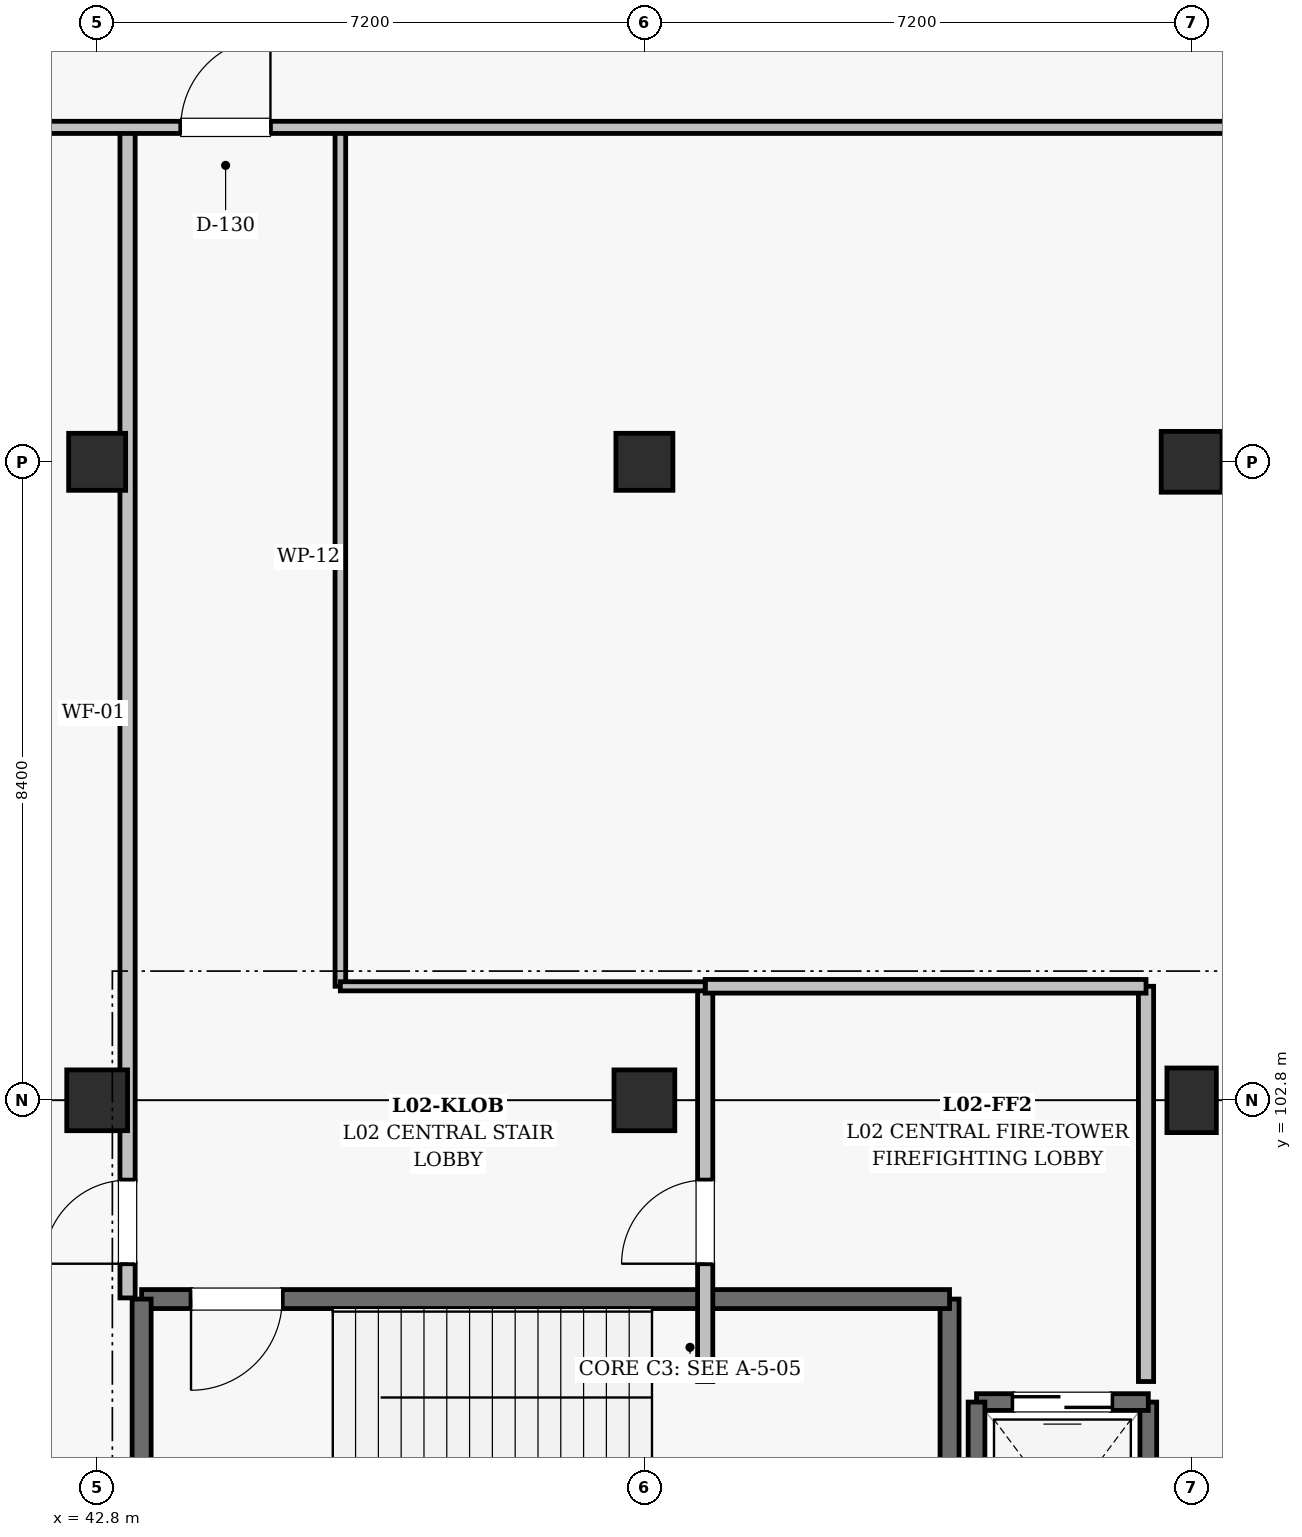
"""IFC4 building model, lengths in metres.
Left out: names, types, materials, properties, quantities, classifications, styles, units other than length and angle.
Written with IfcOpenShell. Run it as: python <this file> out.ifc"""

import sys

from ifc_helpers import new_model, si_unit, direction, frame, frame_2d, origin, origin_2d, place, context, subcontext, project, spatial, rectangle, extrude, element, fill, save


model = new_model("IFC4")
c1 = context("Model", 3, precision=1e-05, world=origin(), true_north=direction((0.0, 1.0)))
c2 = subcontext(c1, "Body", "Model", "MODEL_VIEW")
j1 = project(units=[si_unit("LENGTHUNIT", "METRE"), si_unit("PLANEANGLEUNIT", "RADIAN")], contexts=[c1])
p1 = place(None, origin())
s1 = spatial("IfcSite", under=j1, at=p1, CompositionType="ELEMENT")
p2 = place(p1, origin())
s2 = spatial("IfcBuilding", under=s1, at=p2, CompositionType="ELEMENT")
p3 = place(p2, frame((0.0, 0.0, 9.9)))
s3 = spatial("IfcBuildingStorey", under=s2, at=p3, CompositionType="ELEMENT", Elevation=9.9)
p4 = place(p3, frame((42.8, 102.8, 0.0), z_axis=(0.0, 0.0, 1.0), x_axis=(1.0, 0.0, 0.0)))
e1 = element("IfcColumn", 1, at=p4, inside=s3, PredefinedType="COLUMN", context=c2, shape_type="SweptSolid", body=[
    extrude(rectangle(XDim=0.8, YDim=0.8, at=origin_2d()), origin(), (0.0, 0.0, 1.0), 4.5),
])
p5 = place(p3, frame((42.8, 111.2, 0.0), z_axis=(0.0, 0.0, 1.0), x_axis=(1.0, 0.0, 0.0)))
e2 = element("IfcColumn", 2, at=p5, inside=s3, PredefinedType="COLUMN", context=c2, shape_type="SweptSolid", body=[
    extrude(rectangle(XDim=0.75, YDim=0.75, at=origin_2d()), origin(), (0.0, 0.0, 1.0), 4.5),
])
p6 = place(p3, frame((50.0, 102.8, 0.0), z_axis=(0.0, 0.0, 1.0), x_axis=(1.0, 0.0, 0.0)))
e3 = element("IfcColumn", 3, at=p6, inside=s3, PredefinedType="COLUMN", context=c2, shape_type="SweptSolid", body=[
    extrude(rectangle(XDim=0.8, YDim=0.8, at=origin_2d()), origin(), (0.0, 0.0, 1.0), 4.5),
])
p7 = place(p3, frame((50.0, 111.2, 0.0), z_axis=(0.0, 0.0, 1.0), x_axis=(1.0, 0.0, 0.0)))
e4 = element("IfcColumn", 4, at=p7, inside=s3, PredefinedType="COLUMN", context=c2, shape_type="SweptSolid", body=[
    extrude(rectangle(XDim=0.75, YDim=0.75, at=origin_2d()), origin(), (0.0, 0.0, 1.0), 4.5),
])
p8 = place(p3, frame((57.2, 102.8, 0.0), z_axis=(0.0, 0.0, 1.0), x_axis=(1.0, 0.0, 0.0)))
e5 = element("IfcColumn", 5, at=p8, inside=s3, PredefinedType="COLUMN", context=c2, shape_type="SweptSolid", body=[
    extrude(rectangle(XDim=0.65, YDim=0.85, at=origin_2d()), origin(), (0.0, 0.0, 1.0), 4.5),
])
p9 = place(p3, frame((57.2, 111.2, 0.0), z_axis=(0.0, 0.0, 1.0), x_axis=(1.0, 0.0, 0.0)))
e6 = element("IfcColumn", 6, at=p9, inside=s3, PredefinedType="COLUMN", context=c2, shape_type="SweptSolid", body=[
    extrude(rectangle(XDim=0.8, YDim=0.8, at=origin_2d()), origin(), (0.0, 0.0, 1.0), 4.5),
])
p10 = place(p3, frame((54.015, 95.085, 0.0), z_axis=(0.0, 0.0, 1.0), x_axis=(0.0, 1.0, 0.0)))
e7 = element("IfcWall", 7, at=p10, inside=s3, PredefinedType="SHEAR", context=c2, shape_type="SweptSolid", body=[
    extrude(rectangle(XDim=5.1, YDim=0.25, at=frame_2d((2.55, 0.0))), origin(), (0.0, 0.0, 1.0), 4.215),
])
p11 = place(p3, frame((54.015, 100.185, 0.0), z_axis=(0.0, 0.0, 1.0), x_axis=(-1.0, 0.0, 0.0)))
e8 = element("IfcWall", 8, at=p11, inside=s3, PredefinedType="SHEAR", context=c2, shape_type="SweptSolid", body=[
    extrude(rectangle(XDim=10.63, YDim=0.25, at=frame_2d((5.315, 0.0))), origin(), (0.0, 0.0, 1.0), 4.215),
])
p12 = place(p11, frame((8.78, 0.0, 0.0)))
e9 = element("IfcOpeningElement", 9, at=p12, cuts=e8, PredefinedType="OPENING", context=c2, shape_type="SweptSolid", body=[
    extrude(rectangle(XDim=1.2, YDim=2.15, at=frame_2d((0.6, 1.075))), frame((0.0, 0.135, 0.0), z_axis=(0.0, -1.0, 0.0), x_axis=(1.0, 0.0, 0.0)), (0.0, 0.0, 1.0), 0.27),
])
p13 = place(p3, frame((43.385, 100.185, 0.0), z_axis=(0.0, 0.0, 1.0), x_axis=(0.0, -1.0, 0.0)))
e10 = element("IfcWall", 10, at=p13, inside=s3, PredefinedType="SHEAR", context=c2, shape_type="SweptSolid", body=[
    extrude(rectangle(XDim=5.1, YDim=0.25, at=frame_2d((2.55, 0.0))), origin(), (0.0, 0.0, 1.0), 4.215),
])
p14 = place(p3, frame((56.63, 95.97, 0.0), z_axis=(0.0, 0.0, 1.0), x_axis=(0.0, 1.0, 0.0)))
e11 = element("IfcWall", 11, at=p14, inside=s3, PredefinedType="SHEAR", context=c2, shape_type="SweptSolid", body=[
    extrude(rectangle(XDim=2.86, YDim=0.22, at=frame_2d((1.43, 0.0))), origin(), (0.0, 0.0, 1.0), 4.215),
])
p15 = place(p3, frame((56.63, 98.83, 0.0), z_axis=(0.0, 0.0, 1.0), x_axis=(-1.0, 0.0, 0.0)))
e12 = element("IfcWall", 12, at=p15, inside=s3, PredefinedType="SHEAR", context=c2, shape_type="SweptSolid", body=[
    extrude(rectangle(XDim=2.26, YDim=0.22, at=frame_2d((1.13, 0.0))), origin(), (0.0, 0.0, 1.0), 4.215),
])
p16 = place(p15, frame((0.48, 0.0, 0.0)))
e13 = element("IfcOpeningElement", 13, at=p16, cuts=e12, PredefinedType="OPENING", context=c2, shape_type="SweptSolid", body=[
    extrude(rectangle(XDim=1.3, YDim=2.2, at=frame_2d((0.65, 1.1))), frame((0.0, 0.12, 0.0), z_axis=(0.0, -1.0, 0.0), x_axis=(1.0, 0.0, 0.0)), (0.0, 0.0, 1.0), 0.24),
])
p17 = place(p3, frame((54.37, 98.83, 0.0), z_axis=(0.0, 0.0, 1.0), x_axis=(0.0, -1.0, 0.0)))
e14 = element("IfcWall", 14, at=p17, inside=s3, PredefinedType="SHEAR", context=c2, shape_type="SweptSolid", body=[
    extrude(rectangle(XDim=2.86, YDim=0.22, at=frame_2d((1.43, 0.0))), origin(), (0.0, 0.0, 1.0), 4.215),
])
p18 = place(p3, frame((50.8, 99.1, 0.0), z_axis=(0.0, 0.0, 1.0), x_axis=(0.0, 1.0, 0.0)))
e15 = element("IfcWall", 15, at=p18, inside=s3, PredefinedType="SOLIDWALL", context=c2, shape_type="SweptSolid", body=[
    extrude(rectangle(XDim=5.2, YDim=0.2, at=frame_2d((2.6, 0.0))), origin(), (0.0, 0.0, 1.0), 3.36),
])
p19 = place(p18, frame((1.55, 0.0, 0.0)))
e16 = element("IfcOpeningElement", 16, at=p19, cuts=e15, PredefinedType="OPENING", context=c2, shape_type="SweptSolid", body=[
    extrude(rectangle(XDim=1.1, YDim=2.15, at=frame_2d((0.55, 1.075))), frame((0.0, 0.11, 0.0), z_axis=(0.0, -1.0, 0.0), x_axis=(1.0, 0.0, 0.0)), (0.0, 0.0, 1.0), 0.22),
])
p20 = place(p3, frame((56.6, 99.1, 0.0), z_axis=(0.0, 0.0, 1.0), x_axis=(0.0, 1.0, 0.0)))
e17 = element("IfcWall", 17, at=p20, inside=s3, PredefinedType="SOLIDWALL", context=c2, shape_type="SweptSolid", body=[
    extrude(rectangle(XDim=5.2, YDim=0.2, at=frame_2d((2.6, 0.0))), origin(), (0.0, 0.0, 1.0), 3.36),
])
p21 = place(p3, frame((50.8, 104.3, 0.0), z_axis=(0.0, 0.0, 1.0), x_axis=(1.0, 0.0, 0.0)))
e18 = element("IfcWall", 18, at=p21, inside=s3, PredefinedType="SOLIDWALL", context=c2, shape_type="SweptSolid", body=[
    extrude(rectangle(XDim=5.8, YDim=0.18, at=frame_2d((2.9, 0.0))), origin(), (0.0, 0.0, 1.0), 3.56),
])
p22 = place(p3, frame((43.2, 100.2, 0.0), z_axis=(0.0, 0.0, 1.0), x_axis=(0.0, 1.0, 0.0)))
e19 = element("IfcWall", 19, at=p22, inside=s3, PredefinedType="SOLIDWALL", context=c2, shape_type="SweptSolid", body=[
    extrude(rectangle(XDim=15.4, YDim=0.2, at=frame_2d((7.7, 0.0))), origin(), (0.0, 0.0, 1.0), 2.96),
])
p23 = place(p22, frame((0.45, 0.0, 0.0)))
e20 = element("IfcOpeningElement", 20, at=p23, cuts=e19, PredefinedType="OPENING", context=c2, shape_type="SweptSolid", body=[
    extrude(rectangle(XDim=1.1, YDim=2.15, at=frame_2d((0.55, 1.075))), frame((0.0, 0.11, 0.0), z_axis=(0.0, -1.0, 0.0), x_axis=(1.0, 0.0, 0.0)), (0.0, 0.0, 1.0), 0.22),
])
p24 = place(p3, frame((46.0, 104.3, 0.0), z_axis=(0.0, 0.0, 1.0), x_axis=(0.0, 1.0, 0.0)))
e21 = element("IfcWall", 21, at=p24, inside=s3, PredefinedType="PARTITIONING", context=c2, shape_type="SweptSolid", body=[
    extrude(rectangle(XDim=11.3, YDim=0.14, at=frame_2d((5.65, 0.0))), origin(), (0.0, 0.0, 1.0), 3.52),
])
p25 = place(p3, frame((46.0, 104.3, 0.0), z_axis=(0.0, 0.0, 1.0), x_axis=(1.0, 0.0, 0.0)))
e22 = element("IfcWall", 22, at=p25, inside=s3, PredefinedType="PARTITIONING", context=c2, shape_type="SweptSolid", body=[
    extrude(rectangle(XDim=4.8, YDim=0.12, at=frame_2d((2.4, 0.0))), origin(), (0.0, 0.0, 1.0), 3.31),
])
p26 = place(p3, frame((14.0, 115.6, 0.0), z_axis=(0.0, 0.0, 1.0), x_axis=(1.0, 0.0, 0.0)))
e23 = element("IfcWall", 23, at=p26, inside=s3, PredefinedType="PARTITIONING", context=c2, shape_type="SweptSolid", body=[
    extrude(rectangle(XDim=100.8, YDim=0.16, at=frame_2d((50.4, 0.0))), origin(), (0.0, 0.0, 1.0), 2.96),
])
p27 = place(p26, frame((29.9, 0.0, 0.0)))
e24 = element("IfcOpeningElement", 24, at=p27, cuts=e23, PredefinedType="OPENING", context=c2, shape_type="SweptSolid", body=[
    extrude(rectangle(XDim=1.18, YDim=2.2, at=frame_2d((0.59, 1.1))), frame((0.0, 0.09, 0.0), z_axis=(0.0, -1.0, 0.0), x_axis=(1.0, 0.0, 0.0)), (0.0, 0.0, 1.0), 0.18),
])
p28 = place(p26, frame((8.3, 0.0, 0.0)))
e25 = element("IfcOpeningElement", 25, at=p28, cuts=e23, PredefinedType="OPENING", context=c2, shape_type="SweptSolid", body=[
    extrude(rectangle(XDim=1.5, YDim=2.25, at=frame_2d((0.75, 1.125))), frame((0.0, 0.09, 0.0), z_axis=(0.0, -1.0, 0.0), x_axis=(1.0, 0.0, 0.0)), (0.0, 0.0, 1.0), 0.18),
])
p29 = place(p26, frame((24.7, 0.0, 0.0)))
e26 = element("IfcOpeningElement", 26, at=p29, cuts=e23, PredefinedType="OPENING", context=c2, shape_type="SweptSolid", body=[
    extrude(rectangle(XDim=1.5, YDim=2.25, at=frame_2d((0.75, 1.125))), frame((0.0, 0.09, 0.0), z_axis=(0.0, -1.0, 0.0), x_axis=(1.0, 0.0, 0.0)), (0.0, 0.0, 1.0), 0.18),
])
p30 = place(p26, frame((46.6, 0.0, 0.0)))
e27 = element("IfcOpeningElement", 27, at=p30, cuts=e23, PredefinedType="OPENING", context=c2, shape_type="SweptSolid", body=[
    extrude(rectangle(XDim=1.45, YDim=2.2, at=frame_2d((0.725, 1.1))), frame((0.0, 0.09, 0.0), z_axis=(0.0, -1.0, 0.0), x_axis=(1.0, 0.0, 0.0)), (0.0, 0.0, 1.0), 0.18),
])
p31 = place(p26, frame((70.2, 0.0, 0.0)))
e28 = element("IfcOpeningElement", 28, at=p31, cuts=e23, PredefinedType="OPENING", context=c2, shape_type="SweptSolid", body=[
    extrude(rectangle(XDim=1.5, YDim=2.25, at=frame_2d((0.75, 1.125))), frame((0.0, 0.09, 0.0), z_axis=(0.0, -1.0, 0.0), x_axis=(1.0, 0.0, 0.0)), (0.0, 0.0, 1.0), 0.18),
])
p32 = place(p26, frame((89.8, 0.0, 0.0)))
e29 = element("IfcOpeningElement", 29, at=p32, cuts=e23, PredefinedType="OPENING", context=c2, shape_type="SweptSolid", body=[
    extrude(rectangle(XDim=1.5, YDim=2.25, at=frame_2d((0.75, 1.125))), frame((0.0, 0.09, 0.0), z_axis=(0.0, -1.0, 0.0), x_axis=(1.0, 0.0, 0.0)), (0.0, 0.0, 1.0), 0.18),
])
p33 = place(p12, origin())
e30 = element("IfcDoor", 30, at=p33, inside=s3, OperationType="SINGLE_SWING_RIGHT", PredefinedType="DOOR", context=c2, shape_type="SweptSolid", body=[
    extrude(rectangle(XDim=1.2, YDim=2.15, at=frame_2d((0.6, 1.075))), frame((0.0, 0.025, 0.0), z_axis=(0.0, -1.0, 0.0), x_axis=(1.0, 0.0, 0.0)), (0.0, 0.0, 1.0), 0.05),
])
fill(e9, e30)
p34 = place(p16, origin())
e31 = element("IfcDoor", 31, at=p34, inside=s3, OperationType="DOUBLE_DOOR_SLIDING", PredefinedType="DOOR", context=c2, shape_type="SweptSolid", body=[
    extrude(rectangle(XDim=1.3, YDim=2.2, at=frame_2d((0.65, 1.1))), frame((0.0, 0.025, 0.0), z_axis=(0.0, -1.0, 0.0), x_axis=(1.0, 0.0, 0.0)), (0.0, 0.0, 1.0), 0.05),
])
fill(e13, e31)
p35 = place(p19, origin())
e32 = element("IfcDoor", 32, at=p35, inside=s3, OperationType="SINGLE_SWING_LEFT", PredefinedType="DOOR", context=c2, shape_type="SweptSolid", body=[
    extrude(rectangle(XDim=1.1, YDim=2.15, at=frame_2d((0.55, 1.075))), frame((0.0, 0.025, 0.0), z_axis=(0.0, -1.0, 0.0), x_axis=(1.0, 0.0, 0.0)), (0.0, 0.0, 1.0), 0.05),
])
fill(e16, e32)
p36 = place(p23, origin())
e33 = element("IfcDoor", 33, at=p36, inside=s3, OperationType="SINGLE_SWING_LEFT", PredefinedType="DOOR", context=c2, shape_type="SweptSolid", body=[
    extrude(rectangle(XDim=1.1, YDim=2.15, at=frame_2d((0.55, 1.075))), frame((0.0, 0.025, 0.0), z_axis=(0.0, -1.0, 0.0), x_axis=(1.0, 0.0, 0.0)), (0.0, 0.0, 1.0), 0.05),
])
fill(e20, e33)
p37 = place(p27, origin())
e34 = element("IfcDoor", 34, at=p37, inside=s3, OperationType="SINGLE_SWING_RIGHT", PredefinedType="DOOR", context=c2, shape_type="SweptSolid", body=[
    extrude(rectangle(XDim=1.18, YDim=2.2, at=frame_2d((0.59, 1.1))), frame((0.0, 0.025, 0.0), z_axis=(0.0, -1.0, 0.0), x_axis=(1.0, 0.0, 0.0)), (0.0, 0.0, 1.0), 0.05),
])
fill(e24, e34)
save(model, sys.argv[1])
